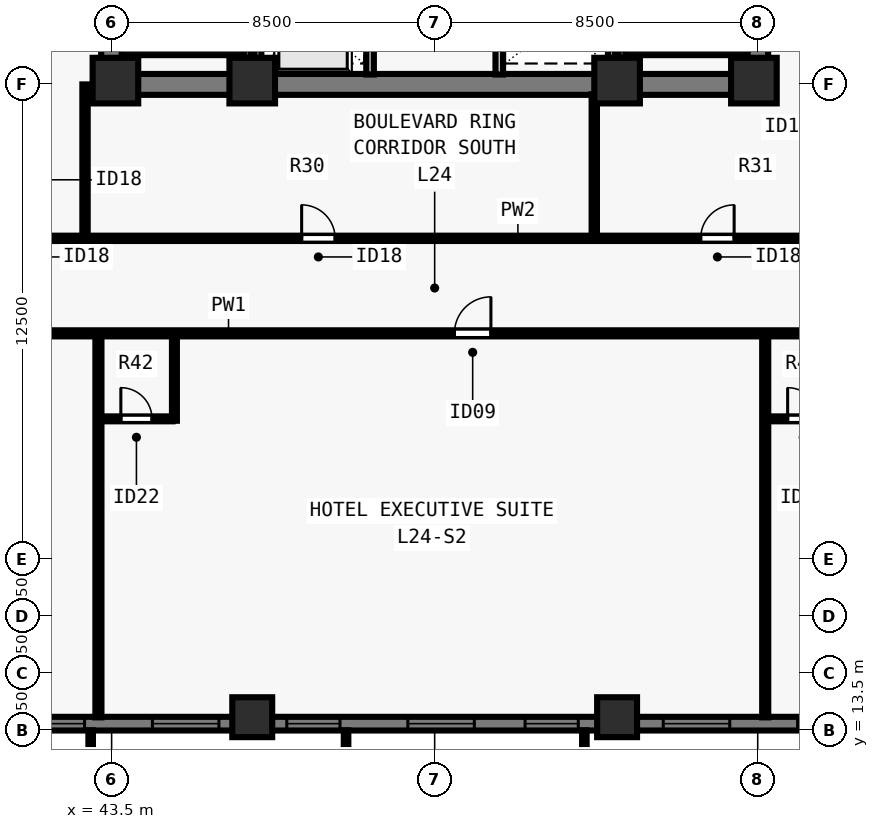
"""IFC4 building model, lengths in metres.
Left out: names, types, materials, properties, quantities, classifications, styles, units other than length and angle.
Written with IfcOpenShell. Run it as: python <this file> out.ifc"""

import sys

from ifc_helpers import new_model, si_unit, direction, frame, frame_2d, origin, origin_2d, place, context, subcontext, project, spatial, rectangle, extrude, element, fill, save


model = new_model("IFC4")
c1 = context("Model", 3, precision=1e-05, world=origin(), true_north=direction((0.0, 1.0)))
c2 = subcontext(c1, "Body", "Model", "MODEL_VIEW")
j1 = project(units=[si_unit("LENGTHUNIT", "METRE"), si_unit("PLANEANGLEUNIT", "RADIAN")], contexts=[c1])
p1 = place(None, origin())
s1 = spatial("IfcSite", under=j1, at=p1, CompositionType="ELEMENT")
p2 = place(p1, origin())
s2 = spatial("IfcBuilding", under=s1, at=p2, CompositionType="ELEMENT")
p3 = place(p2, frame((0.0, 0.0, 90.0)))
s3 = spatial("IfcBuildingStorey", under=s2, at=p3, CompositionType="ELEMENT", Elevation=90.0)
for number, where, z_axis, x_axis in (
    (1, (43.6, 30.6, 0.0), (0.0, 0.0, 1.0), (1.0, 0.0, 0.0)),
    (2, (47.2, 30.6, 0.0), (0.0, 0.0, 1.0), (1.0, 0.0, 0.0)),
    (3, (56.8, 30.6, 0.0), (0.0, 0.0, 1.0), (1.0, 0.0, 0.0)),
    (4, (60.4, 30.6, 0.0), (0.0, 0.0, 1.0), (1.0, 0.0, 0.0)),
):
    element("IfcColumn", number, at=place(p3, frame(where, z_axis=z_axis, x_axis=x_axis)), inside=s3, PredefinedType="COLUMN", context=c2, shape_type="SweptSolid", body=[
        extrude(rectangle(XDim=1.2, YDim=1.2, at=origin_2d()), origin(), (0.0, 0.0, 1.0), 3.5),
    ])
for number, where, z_axis, x_axis in (
    (5, (47.2, 13.85, 0.0), (0.0, 0.0, 1.0), (1.0, 0.0, 0.0)),
    (6, (56.8, 13.85, 0.0), (0.0, 0.0, 1.0), (1.0, 0.0, 0.0)),
):
    element("IfcColumn", number, at=place(p3, frame(where, z_axis=z_axis, x_axis=x_axis)), inside=s3, PredefinedType="COLUMN", context=c2, shape_type="SweptSolid", body=[
        extrude(rectangle(XDim=1.05, YDim=1.05, at=origin_2d()), origin(), (0.0, 0.0, 1.0), 3.5),
    ])
p4 = place(p3, frame((74.5, 13.68, 0.0), z_axis=(0.0, 0.0, 1.0), x_axis=(-1.0, 0.0, 0.0)))
e7 = element("IfcWall", 7, at=p4, inside=s3, PredefinedType="SOLIDWALL", context=c2, shape_type="SweptSolid", body=[
    extrude(rectangle(XDim=44.662, YDim=0.36, at=frame_2d((22.331, 0.0))), origin(), (0.0, 0.0, 1.0), 3.28),
])
p5 = place(p4, frame((4.83, 0.0, 0.8)))
e8 = element("IfcOpeningElement", 8, at=p5, cuts=e7, PredefinedType="OPENING", context=c2, shape_type="SweptSolid", body=[
    extrude(rectangle(XDim=1.4, YDim=1.544, at=frame_2d((0.7, 0.772))), frame((0.0, 0.19, 0.0), z_axis=(0.0, -1.0, 0.0), x_axis=(1.0, 0.0, 0.0)), (0.0, 0.0, 1.0), 0.38),
])
p6 = place(p4, frame((8.015, 0.0, 0.8)))
e9 = element("IfcOpeningElement", 9, at=p6, cuts=e7, PredefinedType="OPENING", context=c2, shape_type="SweptSolid", body=[
    extrude(rectangle(XDim=1.75, YDim=1.544, at=frame_2d((0.875, 0.772))), frame((0.0, 0.19, 0.0), z_axis=(0.0, -1.0, 0.0), x_axis=(1.0, 0.0, 0.0)), (0.0, 0.0, 1.0), 0.38),
])
p7 = place(p4, frame((11.551, 0.0, 0.8)))
e10 = element("IfcOpeningElement", 10, at=p7, cuts=e7, PredefinedType="OPENING", context=c2, shape_type="SweptSolid", body=[
    extrude(rectangle(XDim=1.4, YDim=1.544, at=frame_2d((0.7, 0.772))), frame((0.0, 0.19, 0.0), z_axis=(0.0, -1.0, 0.0), x_axis=(1.0, 0.0, 0.0)), (0.0, 0.0, 1.0), 0.38),
])
p8 = place(p4, frame((14.736, 0.0, 0.8)))
e11 = element("IfcOpeningElement", 11, at=p8, cuts=e7, PredefinedType="OPENING", context=c2, shape_type="SweptSolid", body=[
    extrude(rectangle(XDim=1.75, YDim=1.544, at=frame_2d((0.875, 0.772))), frame((0.0, 0.19, 0.0), z_axis=(0.0, -1.0, 0.0), x_axis=(1.0, 0.0, 0.0)), (0.0, 0.0, 1.0), 0.38),
])
p9 = place(p4, frame((18.721, 0.0, 0.8)))
e12 = element("IfcOpeningElement", 12, at=p9, cuts=e7, PredefinedType="OPENING", context=c2, shape_type="SweptSolid", body=[
    extrude(rectangle(XDim=1.4, YDim=1.544, at=frame_2d((0.7, 0.772))), frame((0.0, 0.19, 0.0), z_axis=(0.0, -1.0, 0.0), x_axis=(1.0, 0.0, 0.0)), (0.0, 0.0, 1.0), 0.38),
])
p10 = place(p4, frame((21.456, 0.0, 0.8)))
e13 = element("IfcOpeningElement", 13, at=p10, cuts=e7, PredefinedType="OPENING", context=c2, shape_type="SweptSolid", body=[
    extrude(rectangle(XDim=1.75, YDim=1.544, at=frame_2d((0.875, 0.772))), frame((0.0, 0.19, 0.0), z_axis=(0.0, -1.0, 0.0), x_axis=(1.0, 0.0, 0.0)), (0.0, 0.0, 1.0), 0.38),
])
p11 = place(p4, frame((24.991, 0.0, 0.8)))
e14 = element("IfcOpeningElement", 14, at=p11, cuts=e7, PredefinedType="OPENING", context=c2, shape_type="SweptSolid", body=[
    extrude(rectangle(XDim=1.4, YDim=1.544, at=frame_2d((0.7, 0.772))), frame((0.0, 0.19, 0.0), z_axis=(0.0, -1.0, 0.0), x_axis=(1.0, 0.0, 0.0)), (0.0, 0.0, 1.0), 0.38),
])
p12 = place(p4, frame((28.177, 0.0, 0.8)))
e15 = element("IfcOpeningElement", 15, at=p12, cuts=e7, PredefinedType="OPENING", context=c2, shape_type="SweptSolid", body=[
    extrude(rectangle(XDim=1.75, YDim=1.544, at=frame_2d((0.875, 0.772))), frame((0.0, 0.19, 0.0), z_axis=(0.0, -1.0, 0.0), x_axis=(1.0, 0.0, 0.0)), (0.0, 0.0, 1.0), 0.38),
])
p13 = place(p4, frame((31.711, 0.0, 0.8)))
e16 = element("IfcOpeningElement", 16, at=p13, cuts=e7, PredefinedType="OPENING", context=c2, shape_type="SweptSolid", body=[
    extrude(rectangle(XDim=1.4, YDim=1.544, at=frame_2d((0.7, 0.772))), frame((0.0, 0.19, 0.0), z_axis=(0.0, -1.0, 0.0), x_axis=(1.0, 0.0, 0.0)), (0.0, 0.0, 1.0), 0.38),
])
p14 = place(p4, frame((34.897, 0.0, 0.8)))
e17 = element("IfcOpeningElement", 17, at=p14, cuts=e7, PredefinedType="OPENING", context=c2, shape_type="SweptSolid", body=[
    extrude(rectangle(XDim=1.75, YDim=1.544, at=frame_2d((0.875, 0.772))), frame((0.0, 0.19, 0.0), z_axis=(0.0, -1.0, 0.0), x_axis=(1.0, 0.0, 0.0)), (0.0, 0.0, 1.0), 0.38),
])
p15 = place(p4, frame((38.432, 0.0, 0.8)))
e18 = element("IfcOpeningElement", 18, at=p15, cuts=e7, PredefinedType="OPENING", context=c2, shape_type="SweptSolid", body=[
    extrude(rectangle(XDim=1.4, YDim=1.544, at=frame_2d((0.7, 0.772))), frame((0.0, 0.19, 0.0), z_axis=(0.0, -1.0, 0.0), x_axis=(1.0, 0.0, 0.0)), (0.0, 0.0, 1.0), 0.38),
])
p16 = place(p3, frame((43.225, 30.5, 0.0), z_axis=(0.0, 0.0, 1.0), x_axis=(1.0, 0.0, 0.0)))
e19 = element("IfcWall", 19, at=p16, inside=s3, PredefinedType="SHEAR", context=c2, shape_type="SweptSolid", body=[
    extrude(rectangle(XDim=17.55, YDim=0.55, at=frame_2d((8.775, 0.0))), origin(), (0.0, 0.0, 1.0), 3.28),
])
for number, where, z_axis, x_axis in (
    (20, (43.5, 30.765, 0.0), (0.0, 0.0, 1.0), (0.0, 1.0, 0.0)),
    (21, (60.5, 30.765, 0.0), (0.0, 0.0, 1.0), (0.0, 1.0, 0.0)),
):
    element("IfcWall", number, at=place(p3, frame(where, z_axis=z_axis, x_axis=x_axis)), inside=s3, PredefinedType="SHEAR", context=c2, shape_type="SweptSolid", body=[
        extrude(rectangle(XDim=7.985, YDim=0.55, at=frame_2d((3.993, 0.0))), origin(), (0.0, 0.0, 1.0), 3.28),
    ])
p17 = place(p3, frame((50.3, 30.76, 0.0), z_axis=(0.0, 0.0, 1.0), x_axis=(0.0, 1.0, 0.0)))
e22 = element("IfcWall", 22, at=p17, inside=s3, PredefinedType="SOLIDWALL", context=c2, shape_type="SweptSolid", body=[
    extrude(rectangle(XDim=7.855, YDim=0.2, at=frame_2d((3.927, 0.0))), origin(), (0.0, 0.0, 1.0), 3.28),
])
p18 = place(p17, frame((0.79, 0.0, 0.0)))
e23 = element("IfcOpeningElement", 23, at=p18, cuts=e22, PredefinedType="OPENING", context=c2, shape_type="SweptSolid", body=[
    extrude(rectangle(XDim=1.1, YDim=2.2, at=frame_2d((0.55, 1.1))), frame((0.0, 0.11, 0.0), z_axis=(0.0, -1.0, 0.0), x_axis=(1.0, 0.0, 0.0)), (0.0, 0.0, 1.0), 0.22),
])
p19 = place(p17, frame((3.49, 0.0, 0.0)))
e24 = element("IfcOpeningElement", 24, at=p19, cuts=e22, PredefinedType="OPENING", context=c2, shape_type="SweptSolid", body=[
    extrude(rectangle(XDim=1.1, YDim=2.2, at=frame_2d((0.55, 1.1))), frame((0.0, 0.11, 0.0), z_axis=(0.0, -1.0, 0.0), x_axis=(1.0, 0.0, 0.0)), (0.0, 0.0, 1.0), 0.22),
])
p20 = place(p17, frame((6.19, 0.0, 0.0)))
e25 = element("IfcOpeningElement", 25, at=p20, cuts=e22, PredefinedType="OPENING", context=c2, shape_type="SweptSolid", body=[
    extrude(rectangle(XDim=1.1, YDim=2.2, at=frame_2d((0.55, 1.1))), frame((0.0, 0.11, 0.0), z_axis=(0.0, -1.0, 0.0), x_axis=(1.0, 0.0, 0.0)), (0.0, 0.0, 1.0), 0.22),
])
p21 = place(p3, frame((53.7, 30.76, 0.0), z_axis=(0.0, 0.0, 1.0), x_axis=(0.0, 1.0, 0.0)))
e26 = element("IfcWall", 26, at=p21, inside=s3, PredefinedType="SOLIDWALL", context=c2, shape_type="SweptSolid", body=[
    extrude(rectangle(XDim=7.855, YDim=0.2, at=frame_2d((3.927, 0.0))), origin(), (0.0, 0.0, 1.0), 3.28),
])
for number, where, z_axis, x_axis in (
    (27, (47.35, 30.76, 0.0), (0.0, 0.0, 1.0), (0.0, 1.0, 0.0)),
    (28, (56.65, 30.76, 0.0), (0.0, 0.0, 1.0), (0.0, 1.0, 0.0)),
):
    element("IfcWall", number, at=place(p3, frame(where, z_axis=z_axis, x_axis=x_axis)), inside=s3, PredefinedType="SOLIDWALL", context=c2, shape_type="SweptSolid", body=[
        extrude(rectangle(XDim=7.855, YDim=0.18, at=frame_2d((3.927, 0.0))), origin(), (0.0, 0.0, 1.0), 3.28),
    ])
p22 = place(p3, frame((37.1, 23.95, 0.0), z_axis=(0.0, 0.0, 1.0), x_axis=(1.0, 0.0, 0.0)))
e29 = element("IfcWall", 29, at=p22, inside=s3, PredefinedType="PARTITIONING", context=c2, shape_type="SweptSolid", body=[
    extrude(rectangle(XDim=29.8, YDim=0.16, at=frame_2d((14.9, 0.0))), origin(), (0.0, 0.0, 1.0), 3.28),
])
p23 = place(p22, frame((2.571, 0.0, 0.0)))
e30 = element("IfcOpeningElement", 30, at=p23, cuts=e29, PredefinedType="OPENING", context=c2, shape_type="SweptSolid", body=[
    extrude(rectangle(XDim=0.96, YDim=2.15, at=frame_2d((0.48, 1.075))), frame((0.0, 0.09, 0.0), z_axis=(0.0, -1.0, 0.0), x_axis=(1.0, 0.0, 0.0)), (0.0, 0.0, 1.0), 0.18),
])
p24 = place(p22, frame((15.42, 0.0, 0.0)))
e31 = element("IfcOpeningElement", 31, at=p24, cuts=e29, PredefinedType="OPENING", context=c2, shape_type="SweptSolid", body=[
    extrude(rectangle(XDim=0.96, YDim=2.15, at=frame_2d((0.48, 1.075))), frame((0.0, 0.09, 0.0), z_axis=(0.0, -1.0, 0.0), x_axis=(1.0, 0.0, 0.0)), (0.0, 0.0, 1.0), 0.18),
])
p25 = place(p22, frame((27.269, 0.0, 0.0)))
e32 = element("IfcOpeningElement", 32, at=p25, cuts=e29, PredefinedType="OPENING", context=c2, shape_type="SweptSolid", body=[
    extrude(rectangle(XDim=0.96, YDim=2.15, at=frame_2d((0.48, 1.075))), frame((0.0, 0.09, 0.0), z_axis=(0.0, -1.0, 0.0), x_axis=(1.0, 0.0, 0.0)), (0.0, 0.0, 1.0), 0.18),
])
p26 = place(p3, frame((39.6, 26.45, 0.0), z_axis=(0.0, 0.0, 1.0), x_axis=(1.0, 0.0, 0.0)))
e33 = element("IfcWall", 33, at=p26, inside=s3, PredefinedType="PARTITIONING", context=c2, shape_type="SweptSolid", body=[
    extrude(rectangle(XDim=24.8, YDim=0.14, at=frame_2d((12.4, 0.0))), origin(), (0.0, 0.0, 1.0), 3.28),
])
p27 = place(p26, frame((1.2, 0.0, 0.0)))
e34 = element("IfcOpeningElement", 34, at=p27, cuts=e33, PredefinedType="OPENING", context=c2, shape_type="SweptSolid", body=[
    extrude(rectangle(XDim=0.88, YDim=2.1, at=frame_2d((0.44, 1.05))), frame((0.0, 0.08, 0.0), z_axis=(0.0, -1.0, 0.0), x_axis=(1.0, 0.0, 0.0)), (0.0, 0.0, 1.0), 0.16),
])
p28 = place(p26, frame((8.9, 0.0, 0.0)))
e35 = element("IfcOpeningElement", 35, at=p28, cuts=e33, PredefinedType="OPENING", context=c2, shape_type="SweptSolid", body=[
    extrude(rectangle(XDim=0.88, YDim=2.1, at=frame_2d((0.44, 1.05))), frame((0.0, 0.08, 0.0), z_axis=(0.0, -1.0, 0.0), x_axis=(1.0, 0.0, 0.0)), (0.0, 0.0, 1.0), 0.16),
])
p29 = place(p26, frame((19.4, 0.0, 0.0)))
e36 = element("IfcOpeningElement", 36, at=p29, cuts=e33, PredefinedType="OPENING", context=c2, shape_type="SweptSolid", body=[
    extrude(rectangle(XDim=0.88, YDim=2.1, at=frame_2d((0.44, 1.05))), frame((0.0, 0.08, 0.0), z_axis=(0.0, -1.0, 0.0), x_axis=(1.0, 0.0, 0.0)), (0.0, 0.0, 1.0), 0.16),
])
p30 = place(p3, frame((42.8, 26.505, 0.0), z_axis=(0.0, 0.0, 1.0), x_axis=(0.0, 1.0, 0.0)))
e37 = element("IfcWall", 37, at=p30, inside=s3, PredefinedType="PARTITIONING", context=c2, shape_type="SweptSolid", body=[
    extrude(rectangle(XDim=3.995, YDim=0.14, at=frame_2d((1.998, 0.0))), origin(), (0.0, 0.0, 1.0), 2.439),
])
p31 = place(p3, frame((56.2, 26.505, 0.0), z_axis=(0.0, 0.0, 1.0), x_axis=(0.0, 1.0, 0.0)))
e38 = element("IfcWall", 38, at=p31, inside=s3, PredefinedType="PARTITIONING", context=c2, shape_type="SweptSolid", body=[
    extrude(rectangle(XDim=3.735, YDim=0.14, at=frame_2d((1.868, 0.0))), origin(), (0.0, 0.0, 1.0), 2.849),
])
p32 = place(p3, frame((43.153, 13.845, 0.0), z_axis=(0.0, 0.0, 1.0), x_axis=(0.0, 1.0, 0.0)))
e39 = element("IfcWall", 39, at=p32, inside=s3, PredefinedType="PARTITIONING", context=c2, shape_type="SweptSolid", body=[
    extrude(rectangle(XDim=10.04, YDim=0.16, at=frame_2d((5.02, 0.0))), origin(), (0.0, 0.0, 1.0), 3.28),
])
p33 = place(p3, frame((45.153, 21.65, 0.0), z_axis=(0.0, 0.0, 1.0), x_axis=(0.0, 1.0, 0.0)))
e40 = element("IfcWall", 40, at=p33, inside=s3, PredefinedType="PLUMBINGWALL", context=c2, shape_type="SweptSolid", body=[
    extrude(rectangle(XDim=2.235, YDim=0.13, at=frame_2d((1.118, 0.0))), origin(), (0.0, 0.0, 1.0), 3.28),
])
p34 = place(p3, frame((43.218, 21.7, 0.0), z_axis=(0.0, 0.0, 1.0), x_axis=(1.0, 0.0, 0.0)))
e41 = element("IfcWall", 41, at=p34, inside=s3, PredefinedType="PLUMBINGWALL", context=c2, shape_type="SweptSolid", body=[
    extrude(rectangle(XDim=1.885, YDim=0.13, at=frame_2d((0.942, 0.0))), origin(), (0.0, 0.0, 1.0), 3.28),
])
p35 = place(p34, frame((0.525, 0.0, 0.0)))
e42 = element("IfcOpeningElement", 42, at=p35, cuts=e41, PredefinedType="OPENING", context=c2, shape_type="SweptSolid", body=[
    extrude(rectangle(XDim=0.82, YDim=2.1, at=frame_2d((0.41, 1.05))), frame((0.0, 0.075, 0.0), z_axis=(0.0, -1.0, 0.0), x_axis=(1.0, 0.0, 0.0)), (0.0, 0.0, 1.0), 0.15),
])
p36 = place(p3, frame((60.698, 13.845, 0.0), z_axis=(0.0, 0.0, 1.0), x_axis=(0.0, 1.0, 0.0)))
e43 = element("IfcWall", 43, at=p36, inside=s3, PredefinedType="PARTITIONING", context=c2, shape_type="SweptSolid", body=[
    extrude(rectangle(XDim=10.04, YDim=0.16, at=frame_2d((5.02, 0.0))), origin(), (0.0, 0.0, 1.0), 3.28),
])
p37 = place(p3, frame((60.762, 21.7, 0.0), z_axis=(0.0, 0.0, 1.0), x_axis=(1.0, 0.0, 0.0)))
e44 = element("IfcWall", 44, at=p37, inside=s3, PredefinedType="PLUMBINGWALL", context=c2, shape_type="SweptSolid", body=[
    extrude(rectangle(XDim=1.885, YDim=0.13, at=frame_2d((0.942, 0.0))), origin(), (0.0, 0.0, 1.0), 3.28),
])
p38 = place(p37, frame((0.525, 0.0, 0.0)))
e45 = element("IfcOpeningElement", 45, at=p38, cuts=e44, PredefinedType="OPENING", context=c2, shape_type="SweptSolid", body=[
    extrude(rectangle(XDim=0.82, YDim=2.1, at=frame_2d((0.41, 1.05))), frame((0.0, 0.075, 0.0), z_axis=(0.0, -1.0, 0.0), x_axis=(1.0, 0.0, 0.0)), (0.0, 0.0, 1.0), 0.15),
])
p39 = place(p3, frame((43.765, 31.36, 0.0), z_axis=(0.0, 0.0, 1.0), x_axis=(1.0, 0.0, 0.0)))
e46 = element("IfcWall", 46, at=p39, inside=s3, PredefinedType="SOLIDWALL", context=c2, shape_type="SweptSolid", body=[
    extrude(rectangle(XDim=3.23, YDim=0.18, at=frame_2d((1.615, 0.0))), origin(), (0.0, 0.0, 1.0), 3.28),
])
p40 = place(p3, frame((47.07, 38.78, 0.0), z_axis=(0.0, 0.0, 1.0), x_axis=(0.0, -1.0, 0.0)))
e47 = element("IfcWall", 47, at=p40, inside=s3, PredefinedType="SOLIDWALL", context=c2, shape_type="SweptSolid", body=[
    extrude(rectangle(XDim=8.017, YDim=0.18, at=frame_2d((4.009, 0.0))), origin(), (0.0, 0.0, 1.0), 3.28),
])
p41 = place(p3, frame((57.005, 31.36, 0.0), z_axis=(0.0, 0.0, 1.0), x_axis=(1.0, 0.0, 0.0)))
e48 = element("IfcWall", 48, at=p41, inside=s3, PredefinedType="SOLIDWALL", context=c2, shape_type="SweptSolid", body=[
    extrude(rectangle(XDim=3.23, YDim=0.18, at=frame_2d((1.615, 0.0))), origin(), (0.0, 0.0, 1.0), 3.28),
])
p42 = place(p3, frame((56.93, 38.78, 0.0), z_axis=(0.0, 0.0, 1.0), x_axis=(0.0, -1.0, 0.0)))
e49 = element("IfcWall", 49, at=p42, inside=s3, PredefinedType="SOLIDWALL", context=c2, shape_type="SweptSolid", body=[
    extrude(rectangle(XDim=8.017, YDim=0.18, at=frame_2d((4.009, 0.0))), origin(), (0.0, 0.0, 1.0), 3.28),
])
p43 = place(p7, origin())
e50 = element("IfcWindow", 50, at=p43, inside=s3, PartitioningType="SINGLE_PANEL", PredefinedType="WINDOW", context=c2, shape_type="SweptSolid", body=[
    extrude(rectangle(XDim=1.4, YDim=1.544, at=frame_2d((0.7, 0.772))), frame((0.0, -0.05, 0.0), z_axis=(0.0, -1.0, 0.0), x_axis=(1.0, 0.0, 0.0)), (0.0, 0.0, 1.0), 0.06),
])
fill(e10, e50)
p44 = place(p8, origin())
e51 = element("IfcWindow", 51, at=p44, inside=s3, PartitioningType="SINGLE_PANEL", PredefinedType="WINDOW", context=c2, shape_type="SweptSolid", body=[
    extrude(rectangle(XDim=1.75, YDim=1.544, at=frame_2d((0.875, 0.772))), frame((0.0, -0.05, 0.0), z_axis=(0.0, -1.0, 0.0), x_axis=(1.0, 0.0, 0.0)), (0.0, 0.0, 1.0), 0.06),
])
fill(e11, e51)
p45 = place(p9, origin())
e52 = element("IfcWindow", 52, at=p45, inside=s3, PartitioningType="SINGLE_PANEL", PredefinedType="WINDOW", context=c2, shape_type="SweptSolid", body=[
    extrude(rectangle(XDim=1.4, YDim=1.544, at=frame_2d((0.7, 0.772))), frame((0.0, -0.05, 0.0), z_axis=(0.0, -1.0, 0.0), x_axis=(1.0, 0.0, 0.0)), (0.0, 0.0, 1.0), 0.06),
])
fill(e12, e52)
p46 = place(p10, origin())
e53 = element("IfcWindow", 53, at=p46, inside=s3, PartitioningType="SINGLE_PANEL", PredefinedType="WINDOW", context=c2, shape_type="SweptSolid", body=[
    extrude(rectangle(XDim=1.75, YDim=1.544, at=frame_2d((0.875, 0.772))), frame((0.0, -0.05, 0.0), z_axis=(0.0, -1.0, 0.0), x_axis=(1.0, 0.0, 0.0)), (0.0, 0.0, 1.0), 0.06),
])
fill(e13, e53)
p47 = place(p11, origin())
e54 = element("IfcWindow", 54, at=p47, inside=s3, PartitioningType="SINGLE_PANEL", PredefinedType="WINDOW", context=c2, shape_type="SweptSolid", body=[
    extrude(rectangle(XDim=1.4, YDim=1.544, at=frame_2d((0.7, 0.772))), frame((0.0, -0.05, 0.0), z_axis=(0.0, -1.0, 0.0), x_axis=(1.0, 0.0, 0.0)), (0.0, 0.0, 1.0), 0.06),
])
fill(e14, e54)
p48 = place(p12, origin())
e55 = element("IfcWindow", 55, at=p48, inside=s3, PartitioningType="SINGLE_PANEL", PredefinedType="WINDOW", context=c2, shape_type="SweptSolid", body=[
    extrude(rectangle(XDim=1.75, YDim=1.544, at=frame_2d((0.875, 0.772))), frame((0.0, -0.05, 0.0), z_axis=(0.0, -1.0, 0.0), x_axis=(1.0, 0.0, 0.0)), (0.0, 0.0, 1.0), 0.06),
])
fill(e15, e55)
p49 = place(p13, origin())
e56 = element("IfcWindow", 56, at=p49, inside=s3, PartitioningType="SINGLE_PANEL", PredefinedType="WINDOW", context=c2, shape_type="SweptSolid", body=[
    extrude(rectangle(XDim=1.4, YDim=1.544, at=frame_2d((0.7, 0.772))), frame((0.0, -0.05, 0.0), z_axis=(0.0, -1.0, 0.0), x_axis=(1.0, 0.0, 0.0)), (0.0, 0.0, 1.0), 0.06),
])
fill(e16, e56)
p50 = place(p28, origin())
e57 = element("IfcDoor", 57, at=p50, inside=s3, OperationType="SINGLE_SWING_LEFT", PredefinedType="DOOR", context=c2, shape_type="SweptSolid", body=[
    extrude(rectangle(XDim=0.88, YDim=2.1, at=frame_2d((0.44, 1.05))), frame((0.0, 0.025, 0.0), z_axis=(0.0, -1.0, 0.0), x_axis=(1.0, 0.0, 0.0)), (0.0, 0.0, 1.0), 0.05),
])
fill(e35, e57)
p51 = place(p29, origin())
e58 = element("IfcDoor", 58, at=p51, inside=s3, OperationType="SINGLE_SWING_RIGHT", PredefinedType="DOOR", context=c2, shape_type="SweptSolid", body=[
    extrude(rectangle(XDim=0.88, YDim=2.1, at=frame_2d((0.44, 1.05))), frame((0.0, 0.025, 0.0), z_axis=(0.0, -1.0, 0.0), x_axis=(1.0, 0.0, 0.0)), (0.0, 0.0, 1.0), 0.05),
])
fill(e36, e58)
p52 = place(p35, origin())
e59 = element("IfcDoor", 59, at=p52, inside=s3, OperationType="SINGLE_SWING_LEFT", PredefinedType="DOOR", context=c2, shape_type="SweptSolid", body=[
    extrude(rectangle(XDim=0.82, YDim=2.1, at=frame_2d((0.41, 1.05))), frame((0.0, 0.025, 0.0), z_axis=(0.0, -1.0, 0.0), x_axis=(1.0, 0.0, 0.0)), (0.0, 0.0, 1.0), 0.05),
])
fill(e42, e59)
p53 = place(p24, origin())
e60 = element("IfcDoor", 60, at=p53, inside=s3, OperationType="SINGLE_SWING_RIGHT", PredefinedType="DOOR", context=c2, shape_type="SweptSolid", body=[
    extrude(rectangle(XDim=0.96, YDim=2.15, at=frame_2d((0.48, 1.075))), frame((0.0, 0.025, 0.0), z_axis=(0.0, -1.0, 0.0), x_axis=(1.0, 0.0, 0.0)), (0.0, 0.0, 1.0), 0.05),
])
fill(e31, e60)
p54 = place(p38, origin())
e61 = element("IfcDoor", 61, at=p54, inside=s3, OperationType="SINGLE_SWING_LEFT", PredefinedType="DOOR", context=c2, shape_type="SweptSolid", body=[
    extrude(rectangle(XDim=0.82, YDim=2.1, at=frame_2d((0.41, 1.05))), frame((0.0, 0.025, 0.0), z_axis=(0.0, -1.0, 0.0), x_axis=(1.0, 0.0, 0.0)), (0.0, 0.0, 1.0), 0.05),
])
fill(e45, e61)
save(model, sys.argv[1])
